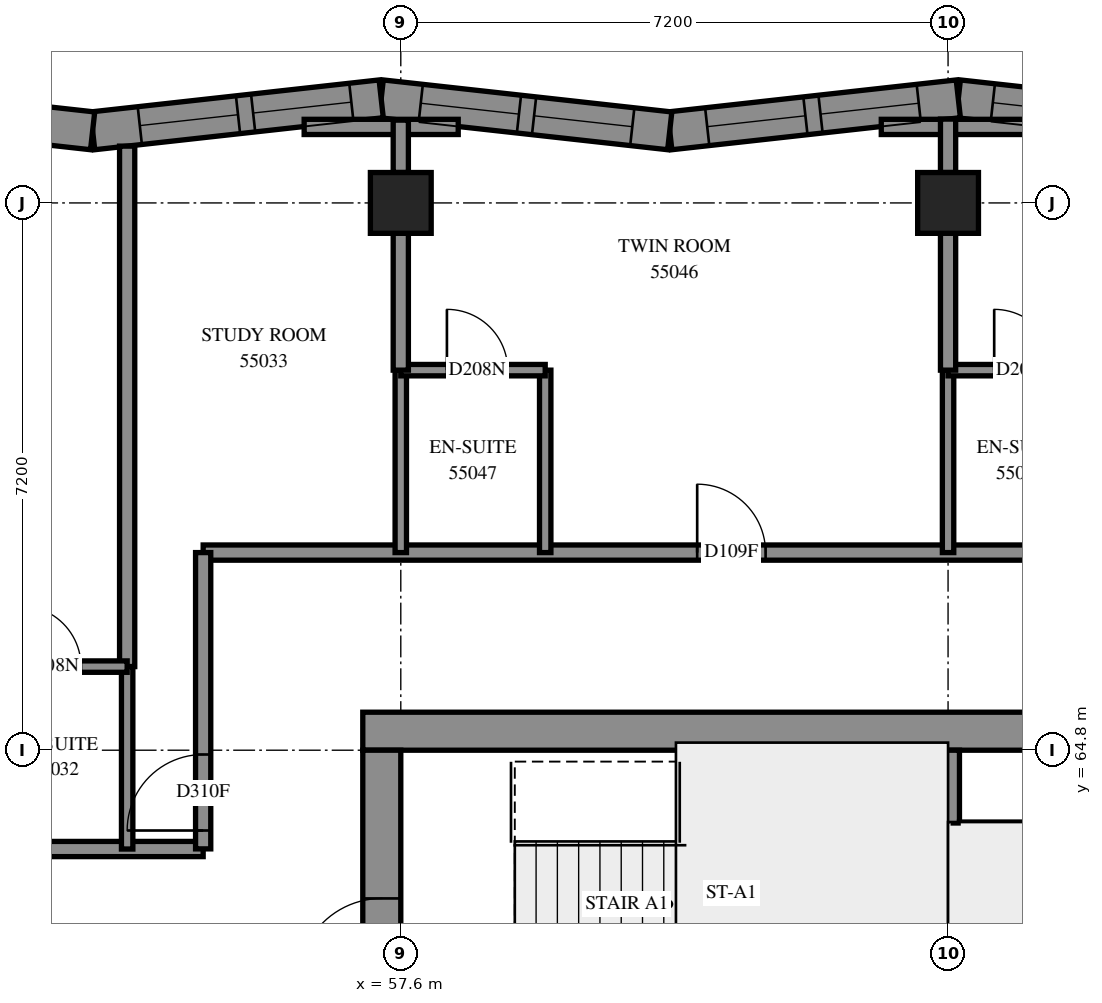
"""IFC4 building model, lengths in metres.
Left out: names, types, materials, properties, quantities, classifications, styles, units other than length and angle.
Written with IfcOpenShell. Run it as: python <this file> out.ifc"""

import sys

from ifc_helpers import new_model, si_unit, direction, frame, frame_2d, origin, origin_2d, place, context, subcontext, project, spatial, polyline, rectangle, outline, extrude, element, fill, save


model = new_model("IFC4")
c1 = context("Model", 3, precision=1e-05, world=origin(), true_north=direction((0.0, 1.0)))
c2 = subcontext(c1, "Body", "Model", "MODEL_VIEW")
j1 = project(units=[si_unit("LENGTHUNIT", "METRE"), si_unit("PLANEANGLEUNIT", "RADIAN")], contexts=[c1])
p1 = place(None, origin())
s1 = spatial("IfcSite", under=j1, at=p1, CompositionType="ELEMENT")
p2 = place(p1, origin())
s2 = spatial("IfcBuilding", under=s1, at=p2, CompositionType="ELEMENT")
p3 = place(p2, frame((0.0, 0.0, 203.2)))
s3 = spatial("IfcBuildingStorey", under=s2, at=p3, CompositionType="ELEMENT", Elevation=203.2)
for number, where, z_axis, x_axis in (
    (1, (57.6, 72.0, 0.0), (0.0, 0.0, 1.0), (1.0, 0.0, 0.0)),
    (2, (64.8, 72.0, 0.0), (0.0, 0.0, 1.0), (1.0, 0.0, 0.0)),
):
    element("IfcColumn", number, at=place(p3, frame(where, z_axis=z_axis, x_axis=x_axis)), inside=s3, PredefinedType="COLUMN", context=c2, shape_type="SweptSolid", body=[
        extrude(rectangle(XDim=0.8, YDim=0.8, at=origin_2d()), origin(), (0.0, 0.0, 1.0), 3.1),
    ])
p4 = place(p3, frame((57.1, 65.05, -0.3), z_axis=(0.0, 0.0, 1.0), x_axis=(1.0, 0.0, 0.0)))
e3 = element("IfcWall", 3, at=p4, inside=s3, PredefinedType="SHEAR", context=c2, shape_type="SweptSolid", body=[
    extrude(rectangle(XDim=15.4, YDim=0.5, at=frame_2d((7.7, 0.0))), origin(), (0.0, 0.0, 1.0), 2.7),
])
p5 = place(p4, frame((10.5, 0.0, 0.3)))
e4 = element("IfcOpeningElement", 4, at=p5, cuts=e3, PredefinedType="OPENING", context=c2, shape_type="SweptSolid", body=[
    extrude(rectangle(XDim=0.8, YDim=2.1, at=frame_2d((0.4, 1.05))), frame((0.0, 0.26, 0.0), z_axis=(0.0, -1.0, 0.0), x_axis=(1.0, 0.0, 0.0)), (0.0, 0.0, 1.0), 0.52),
])
p6 = place(p3, frame((57.35, 50.4, -0.3), z_axis=(0.0, 0.0, 1.0), x_axis=(0.0, 1.0, 0.0)))
e5 = element("IfcWall", 5, at=p6, inside=s3, PredefinedType="SHEAR", context=c2, shape_type="SweptSolid", body=[
    extrude(rectangle(XDim=14.4, YDim=0.5, at=frame_2d((7.2, 0.0))), origin(), (0.0, 0.0, 1.0), 2.7),
])
p7 = place(p6, frame((4.55, 0.0, 0.3)))
e6 = element("IfcOpeningElement", 6, at=p7, cuts=e5, PredefinedType="OPENING", context=c2, shape_type="SweptSolid", body=[
    extrude(rectangle(XDim=1.1, YDim=2.1, at=frame_2d((0.55, 1.05))), frame((0.0, 0.26, 0.0), z_axis=(0.0, -1.0, 0.0), x_axis=(1.0, 0.0, 0.0)), (0.0, 0.0, 1.0), 0.52),
])
p8 = place(p6, frame((11.35, 0.0, 0.3)))
e7 = element("IfcOpeningElement", 7, at=p8, cuts=e5, PredefinedType="OPENING", context=c2, shape_type="SweptSolid", body=[
    extrude(rectangle(XDim=1.1, YDim=2.1, at=frame_2d((0.55, 1.05))), frame((0.0, 0.26, 0.0), z_axis=(0.0, -1.0, 0.0), x_axis=(1.0, 0.0, 0.0)), (0.0, 0.0, 1.0), 0.52),
])
p9 = place(p3, frame((64.8, 60.6, 0.0), z_axis=(0.0, 0.0, 1.0), x_axis=(0.0, 1.0, 0.0)))
e8 = element("IfcWall", 8, at=p9, inside=s3, PredefinedType="SOLIDWALL", context=c2, shape_type="SweptSolid", body=[
    extrude(rectangle(XDim=4.2, YDim=0.3, at=frame_2d((2.1, 0.0))), origin(), (0.0, 0.0, 1.0), 3.1),
])
p10 = place(p3, frame((68.731, 72.948, 0.0), z_axis=(0.0, 0.0, 1.0), x_axis=(-0.99390702, 0.1102217568, 0.0)))
e9 = element("IfcWall", 9, at=p10, inside=s3, PredefinedType="SOLIDWALL", context=c2, shape_type="SweptSolid", body=[
    extrude(outline(polyline([(0.028, -0.25), (3.847, -0.25), (3.792, 0.25), (-0.028, 0.25), (0.028, -0.25)])), origin(), (0.0, 0.0, 1.0), 3.1),
])
p11 = place(p10, frame((0.562, 0.0, 0.45)))
e10 = element("IfcOpeningElement", 10, at=p11, cuts=e9, PredefinedType="OPENING", context=c2, shape_type="SweptSolid", body=[
    extrude(rectangle(XDim=1.3, YDim=2.5, at=frame_2d((0.65, 1.25))), frame((0.0, 0.26, 0.0), z_axis=(0.0, -1.0, 0.0), x_axis=(1.0, 0.0, 0.0)), (0.0, 0.0, 1.0), 0.52),
])
p12 = place(p10, frame((2.062, 0.0, 0.45)))
e11 = element("IfcOpeningElement", 11, at=p12, cuts=e9, PredefinedType="OPENING", context=c2, shape_type="SweptSolid", body=[
    extrude(rectangle(XDim=1.3, YDim=2.5, at=frame_2d((0.65, 1.25))), frame((0.0, 0.26, 0.0), z_axis=(0.0, -1.0, 0.0), x_axis=(1.0, 0.0, 0.0)), (0.0, 0.0, 1.0), 0.52),
])
p13 = place(p3, frame((64.935, 73.37, 0.0), z_axis=(0.0, 0.0, 1.0), x_axis=(-0.993907338, -0.1102188888, 0.0)))
e12 = element("IfcWall", 12, at=p13, inside=s3, PredefinedType="SOLIDWALL", context=c2, shape_type="SweptSolid", body=[
    extrude(outline(polyline([(-0.028, -0.25), (3.792, -0.25), (3.847, 0.25), (0.028, 0.25), (-0.028, -0.25)])), origin(), (0.0, 0.0, 1.0), 3.1),
])
p14 = place(p13, frame((0.524, 0.0, 0.45)))
e13 = element("IfcOpeningElement", 13, at=p14, cuts=e12, PredefinedType="OPENING", context=c2, shape_type="SweptSolid", body=[
    extrude(rectangle(XDim=1.3, YDim=2.5, at=frame_2d((0.65, 1.25))), frame((0.0, 0.26, 0.0), z_axis=(0.0, -1.0, 0.0), x_axis=(1.0, 0.0, 0.0)), (0.0, 0.0, 1.0), 0.52),
])
p15 = place(p13, frame((2.024, 0.0, 0.45)))
e14 = element("IfcOpeningElement", 14, at=p15, cuts=e12, PredefinedType="OPENING", context=c2, shape_type="SweptSolid", body=[
    extrude(rectangle(XDim=1.3, YDim=2.5, at=frame_2d((0.65, 1.25))), frame((0.0, 0.26, 0.0), z_axis=(0.0, -1.0, 0.0), x_axis=(1.0, 0.0, 0.0)), (0.0, 0.0, 1.0), 0.52),
])
p16 = place(p3, frame((61.138, 72.948, 0.0), z_axis=(0.0, 0.0, 1.0), x_axis=(-0.99390702, 0.1102217568, 0.0)))
e15 = element("IfcWall", 15, at=p16, inside=s3, PredefinedType="SOLIDWALL", context=c2, shape_type="SweptSolid", body=[
    extrude(outline(polyline([(0.028, -0.25), (3.847, -0.25), (3.792, 0.25), (-0.028, 0.25), (0.028, -0.25)])), origin(), (0.0, 0.0, 1.0), 3.1),
])
p17 = place(p16, frame((0.496, 0.0, 0.45)))
e16 = element("IfcOpeningElement", 16, at=p17, cuts=e15, PredefinedType="OPENING", context=c2, shape_type="SweptSolid", body=[
    extrude(rectangle(XDim=1.3, YDim=2.5, at=frame_2d((0.65, 1.25))), frame((0.0, 0.26, 0.0), z_axis=(0.0, -1.0, 0.0), x_axis=(1.0, 0.0, 0.0)), (0.0, 0.0, 1.0), 0.52),
])
p18 = place(p16, frame((1.996, 0.0, 0.45)))
e17 = element("IfcOpeningElement", 17, at=p18, cuts=e15, PredefinedType="OPENING", context=c2, shape_type="SweptSolid", body=[
    extrude(rectangle(XDim=1.3, YDim=2.5, at=frame_2d((0.65, 1.25))), frame((0.0, 0.26, 0.0), z_axis=(0.0, -1.0, 0.0), x_axis=(1.0, 0.0, 0.0)), (0.0, 0.0, 1.0), 0.52),
])
p19 = place(p3, frame((57.342, 73.37, 0.0), z_axis=(0.0, 0.0, 1.0), x_axis=(-0.99390702, -0.1102217568, 0.0)))
e18 = element("IfcWall", 18, at=p19, inside=s3, PredefinedType="SOLIDWALL", context=c2, shape_type="SweptSolid", body=[
    extrude(outline(polyline([(-0.028, -0.25), (3.792, -0.25), (3.847, 0.25), (0.028, 0.25), (-0.028, -0.25)])), origin(), (0.0, 0.0, 1.0), 3.1),
])
p20 = place(p19, frame((0.395, 0.0, 0.45)))
e19 = element("IfcOpeningElement", 19, at=p20, cuts=e18, PredefinedType="OPENING", context=c2, shape_type="SweptSolid", body=[
    extrude(rectangle(XDim=1.3, YDim=2.5, at=frame_2d((0.65, 1.25))), frame((0.0, 0.26, 0.0), z_axis=(0.0, -1.0, 0.0), x_axis=(1.0, 0.0, 0.0)), (0.0, 0.0, 1.0), 0.52),
])
p21 = place(p19, frame((1.895, 0.0, 0.45)))
e20 = element("IfcOpeningElement", 20, at=p21, cuts=e18, PredefinedType="OPENING", context=c2, shape_type="SweptSolid", body=[
    extrude(rectangle(XDim=1.3, YDim=2.5, at=frame_2d((0.65, 1.25))), frame((0.0, 0.26, 0.0), z_axis=(0.0, -1.0, 0.0), x_axis=(1.0, 0.0, 0.0)), (0.0, 0.0, 1.0), 0.52),
])
p22 = place(p3, frame((53.546, 72.948, 0.0), z_axis=(0.0, 0.0, 1.0), x_axis=(-0.99390702, 0.1102217568, 0.0)))
e21 = element("IfcWall", 21, at=p22, inside=s3, PredefinedType="SOLIDWALL", context=c2, shape_type="SweptSolid", body=[
    extrude(outline(polyline([(0.028, -0.25), (3.847, -0.25), (3.792, 0.25), (-0.028, 0.25), (0.028, -0.25)])), origin(), (0.0, 0.0, 1.0), 3.1),
])
p23 = place(p22, frame((1.083, 0.0, 0.45)))
e22 = element("IfcOpeningElement", 22, at=p23, cuts=e21, PredefinedType="OPENING", context=c2, shape_type="SweptSolid", body=[
    extrude(rectangle(XDim=1.2, YDim=2.5, at=frame_2d((0.6, 1.25))), frame((0.0, 0.26, 0.0), z_axis=(0.0, -1.0, 0.0), x_axis=(1.0, 0.0, 0.0)), (0.0, 0.0, 1.0), 0.52),
])
p24 = place(p3, frame((64.95, 63.78, 0.0), z_axis=(0.0, 0.0, 1.0), x_axis=(1.0, 0.0, 0.0)))
e23 = element("IfcWall", 23, at=p24, inside=s3, PredefinedType="PARTITIONING", context=c2, shape_type="SweptSolid", body=[
    extrude(rectangle(XDim=5.65, YDim=0.15, at=frame_2d((2.825, 0.0))), origin(), (0.0, 0.0, 1.0), 3.1),
])
p25 = place(p3, frame((55.0, 67.4, 0.0), z_axis=(0.0, 0.0, 1.0), x_axis=(1.0, 0.0, 0.0)))
e24 = element("IfcWall", 24, at=p25, inside=s3, PredefinedType="PARTITIONING", context=c2, shape_type="SweptSolid", body=[
    extrude(rectangle(XDim=19.6, YDim=0.2, at=frame_2d((9.8, 0.0))), origin(), (0.0, 0.0, 1.0), 3.1),
])
p26 = place(p25, frame((6.499, 0.0, 0.0)))
e25 = element("IfcOpeningElement", 25, at=p26, cuts=e24, PredefinedType="OPENING", context=c2, shape_type="SweptSolid", body=[
    extrude(rectangle(XDim=0.9, YDim=2.1, at=frame_2d((0.45, 1.05))), frame((0.0, 0.11, 0.0), z_axis=(0.0, -1.0, 0.0), x_axis=(1.0, 0.0, 0.0)), (0.0, 0.0, 1.0), 0.22),
])
p27 = place(p25, frame((14.001, 0.0, 0.0)))
e26 = element("IfcOpeningElement", 26, at=p27, cuts=e24, PredefinedType="OPENING", context=c2, shape_type="SweptSolid", body=[
    extrude(rectangle(XDim=0.9, YDim=2.1, at=frame_2d((0.45, 1.05))), frame((0.0, 0.11, 0.0), z_axis=(0.0, -1.0, 0.0), x_axis=(1.0, 0.0, 0.0)), (0.0, 0.0, 1.0), 0.22),
])
p28 = place(p3, frame((40.702, 63.5, 0.0), z_axis=(0.0, 0.0, 1.0), x_axis=(1.0, 0.0, 0.0)))
e27 = element("IfcWall", 27, at=p28, inside=s3, PredefinedType="PARTITIONING", context=c2, shape_type="SweptSolid", body=[
    extrude(rectangle(XDim=14.298, YDim=0.2, at=frame_2d((7.149, 0.0))), origin(), (0.0, 0.0, 1.0), 3.1),
])
p29 = place(p28, frame((6.332, 0.0, 0.0)))
e28 = element("IfcOpeningElement", 28, at=p29, cuts=e27, PredefinedType="OPENING", context=c2, shape_type="SweptSolid", body=[
    extrude(rectangle(XDim=0.9, YDim=2.1, at=frame_2d((0.45, 1.05))), frame((0.0, 0.11, 0.0), z_axis=(0.0, -1.0, 0.0), x_axis=(1.0, 0.0, 0.0)), (0.0, 0.0, 1.0), 0.22),
])
p30 = place(p28, frame((10.098, 0.0, 0.0)))
e29 = element("IfcOpeningElement", 29, at=p30, cuts=e27, PredefinedType="OPENING", context=c2, shape_type="SweptSolid", body=[
    extrude(rectangle(XDim=0.9, YDim=2.1, at=frame_2d((0.45, 1.05))), frame((0.0, 0.11, 0.0), z_axis=(0.0, -1.0, 0.0), x_axis=(1.0, 0.0, 0.0)), (0.0, 0.0, 1.0), 0.22),
])
p31 = place(p3, frame((54.0, 65.9, 0.0), z_axis=(0.0, 0.0, 1.0), x_axis=(0.0, 1.0, 0.0)))
e30 = element("IfcWall", 30, at=p31, inside=s3, PredefinedType="PARTITIONING", context=c2, shape_type="SweptSolid", body=[
    extrude(rectangle(XDim=6.847, YDim=0.2, at=frame_2d((3.424, 0.0))), origin(), (0.0, 0.0, 1.0), 3.1),
])
p32 = place(p3, frame((55.0, 63.502, 0.0), z_axis=(0.0, 0.0, 1.0), x_axis=(0.0, 1.0, 0.0)))
e31 = element("IfcWall", 31, at=p32, inside=s3, PredefinedType="PARTITIONING", context=c2, shape_type="SweptSolid", body=[
    extrude(rectangle(XDim=3.898, YDim=0.2, at=frame_2d((1.949, 0.0))), origin(), (0.0, 0.0, 1.0), 3.1),
])
p33 = place(p32, frame((0.242, 0.0, 0.0)))
e32 = element("IfcOpeningElement", 32, at=p33, cuts=e31, PredefinedType="OPENING", context=c2, shape_type="SweptSolid", body=[
    extrude(rectangle(XDim=1.0, YDim=2.1, at=frame_2d((0.5, 1.05))), frame((0.0, 0.11, 0.0), z_axis=(0.0, -1.0, 0.0), x_axis=(1.0, 0.0, 0.0)), (0.0, 0.0, 1.0), 0.22),
])
for number, where, z_axis, x_axis in (
    (33, (54.0, 63.5, 0.0), (0.0, 0.0, 1.0), (0.0, 1.0, 0.0)),
    (34, (59.5, 67.4, 0.0), (0.0, 0.0, 1.0), (0.0, 1.0, 0.0)),
    (35, (57.6, 67.4, 0.0), (0.0, 0.0, 1.0), (0.0, 1.0, 0.0)),
    (36, (64.8, 67.4, 0.0), (0.0, 0.0, 1.0), (0.0, 1.0, 0.0)),
):
    element("IfcWall", number, at=place(p3, frame(where, z_axis=z_axis, x_axis=x_axis)), inside=s3, PredefinedType="PARTITIONING", context=c2, shape_type="SweptSolid", body=[
        extrude(rectangle(XDim=2.4, YDim=0.15, at=frame_2d((1.2, 0.0))), origin(), (0.0, 0.0, 1.0), 3.1),
    ])
for number, where, z_axis, x_axis in (
    (37, (56.329, 73.0, 0.0), (0.0, 0.0, 1.0), (1.0, 0.0, 0.0)),
    (38, (63.921, 73.0, 0.0), (0.0, 0.0, 1.0), (1.0, 0.0, 0.0)),
):
    element("IfcWall", number, at=place(p3, frame(where, z_axis=z_axis, x_axis=x_axis)), inside=s3, PredefinedType="PARTITIONING", context=c2, shape_type="SweptSolid", body=[
        extrude(rectangle(XDim=2.027, YDim=0.2, at=frame_2d((1.013, 0.0))), origin(), (0.0, 0.0, 1.0), 3.1),
    ])
p34 = place(p3, frame((64.8, 69.8, 0.0), z_axis=(0.0, 0.0, 1.0), x_axis=(1.0, 0.0, 0.0)))
e39 = element("IfcWall", 39, at=p34, inside=s3, PredefinedType="PARTITIONING", context=c2, shape_type="SweptSolid", body=[
    extrude(rectangle(XDim=1.9, YDim=0.15, at=frame_2d((0.95, 0.0))), origin(), (0.0, 0.0, 1.0), 3.1),
])
p35 = place(p34, frame((0.607, 0.0, 0.0)))
e40 = element("IfcOpeningElement", 40, at=p35, cuts=e39, PredefinedType="OPENING", context=c2, shape_type="SweptSolid", body=[
    extrude(rectangle(XDim=0.8, YDim=2.1, at=frame_2d((0.4, 1.05))), frame((0.0, 0.085, 0.0), z_axis=(0.0, -1.0, 0.0), x_axis=(1.0, 0.0, 0.0)), (0.0, 0.0, 1.0), 0.17),
])
p36 = place(p3, frame((52.1, 65.9, 0.0), z_axis=(0.0, 0.0, 1.0), x_axis=(1.0, 0.0, 0.0)))
e41 = element("IfcWall", 41, at=p36, inside=s3, PredefinedType="PARTITIONING", context=c2, shape_type="SweptSolid", body=[
    extrude(rectangle(XDim=1.9, YDim=0.15, at=frame_2d((0.95, 0.0))), origin(), (0.0, 0.0, 1.0), 3.1),
])
p37 = place(p36, frame((0.493, 0.0, 0.0)))
e42 = element("IfcOpeningElement", 42, at=p37, cuts=e41, PredefinedType="OPENING", context=c2, shape_type="SweptSolid", body=[
    extrude(rectangle(XDim=0.8, YDim=2.1, at=frame_2d((0.4, 1.05))), frame((0.0, 0.085, 0.0), z_axis=(0.0, -1.0, 0.0), x_axis=(1.0, 0.0, 0.0)), (0.0, 0.0, 1.0), 0.17),
])
p38 = place(p3, frame((57.6, 69.8, 0.0), z_axis=(0.0, 0.0, 1.0), x_axis=(1.0, 0.0, 0.0)))
e43 = element("IfcWall", 43, at=p38, inside=s3, PredefinedType="PARTITIONING", context=c2, shape_type="SweptSolid", body=[
    extrude(rectangle(XDim=1.9, YDim=0.15, at=frame_2d((0.95, 0.0))), origin(), (0.0, 0.0, 1.0), 3.1),
])
p39 = place(p38, frame((0.607, 0.0, 0.0)))
e44 = element("IfcOpeningElement", 44, at=p39, cuts=e43, PredefinedType="OPENING", context=c2, shape_type="SweptSolid", body=[
    extrude(rectangle(XDim=0.8, YDim=2.1, at=frame_2d((0.4, 1.05))), frame((0.0, 0.085, 0.0), z_axis=(0.0, -1.0, 0.0), x_axis=(1.0, 0.0, 0.0)), (0.0, 0.0, 1.0), 0.17),
])
for number, where, z_axis, x_axis in (
    (45, (57.6, 69.8, 0.0), (0.0, 0.0, 1.0), (0.0, 1.0, 0.0)),
    (46, (64.8, 69.8, 0.0), (0.0, 0.0, 1.0), (0.0, 1.0, 0.0)),
):
    element("IfcWall", number, at=place(p3, frame(where, z_axis=z_axis, x_axis=x_axis)), inside=s3, PredefinedType="PARTITIONING", context=c2, shape_type="SweptSolid", body=[
        extrude(rectangle(XDim=1.8, YDim=0.2, at=frame_2d((0.9, 0.0))), origin(), (0.0, 0.0, 1.0), 3.1),
    ])
p40 = place(p3, frame((64.8, 72.4, 0.0), z_axis=(0.0, 0.0, 1.0), x_axis=(0.0, 1.0, 0.0)))
e47 = element("IfcWall", 47, at=p40, inside=s3, PredefinedType="PARTITIONING", context=c2, shape_type="SweptSolid", body=[
    extrude(rectangle(XDim=0.703, YDim=0.2, at=frame_2d((0.351, 0.0))), origin(), (0.0, 0.0, 1.0), 3.1),
])
p41 = place(p3, frame((57.6, 72.4, 0.0), z_axis=(0.0, 0.0, 1.0), x_axis=(0.0, 1.0, 0.0)))
e48 = element("IfcWall", 48, at=p41, inside=s3, PredefinedType="PARTITIONING", context=c2, shape_type="SweptSolid", body=[
    extrude(rectangle(XDim=0.689, YDim=0.2, at=frame_2d((0.345, 0.0))), origin(), (0.0, 0.0, 1.0), 3.1),
])
p42 = place(p12, origin())
e49 = element("IfcWindow", 49, at=p42, inside=s3, PartitioningType="SINGLE_PANEL", PredefinedType="WINDOW", context=c2, shape_type="SweptSolid", body=[
    extrude(rectangle(XDim=1.3, YDim=2.5, at=frame_2d((0.65, 1.25))), frame((0.0, 0.12, 0.0), z_axis=(0.0, -1.0, 0.0), x_axis=(1.0, 0.0, 0.0)), (0.0, 0.0, 1.0), 0.06),
])
fill(e11, e49)
p43 = place(p14, origin())
e50 = element("IfcWindow", 50, at=p43, inside=s3, PartitioningType="SINGLE_PANEL", PredefinedType="WINDOW", context=c2, shape_type="SweptSolid", body=[
    extrude(rectangle(XDim=1.3, YDim=2.5, at=frame_2d((0.65, 1.25))), frame((0.0, 0.12, 0.0), z_axis=(0.0, -1.0, 0.0), x_axis=(1.0, 0.0, 0.0)), (0.0, 0.0, 1.0), 0.06),
])
fill(e13, e50)
p44 = place(p15, origin())
e51 = element("IfcWindow", 51, at=p44, inside=s3, PartitioningType="SINGLE_PANEL", PredefinedType="WINDOW", context=c2, shape_type="SweptSolid", body=[
    extrude(rectangle(XDim=1.3, YDim=2.5, at=frame_2d((0.65, 1.25))), frame((0.0, 0.18, 0.0), z_axis=(0.0, -1.0, 0.0), x_axis=(1.0, 0.0, 0.0)), (0.0, 0.0, 1.0), 0.06),
])
fill(e14, e51)
p45 = place(p17, origin())
e52 = element("IfcWindow", 52, at=p45, inside=s3, PartitioningType="SINGLE_PANEL", PredefinedType="WINDOW", context=c2, shape_type="SweptSolid", body=[
    extrude(rectangle(XDim=1.3, YDim=2.5, at=frame_2d((0.65, 1.25))), frame((0.0, 0.18, 0.0), z_axis=(0.0, -1.0, 0.0), x_axis=(1.0, 0.0, 0.0)), (0.0, 0.0, 1.0), 0.06),
])
fill(e16, e52)
p46 = place(p18, origin())
e53 = element("IfcWindow", 53, at=p46, inside=s3, PartitioningType="SINGLE_PANEL", PredefinedType="WINDOW", context=c2, shape_type="SweptSolid", body=[
    extrude(rectangle(XDim=1.3, YDim=2.5, at=frame_2d((0.65, 1.25))), frame((0.0, 0.12, 0.0), z_axis=(0.0, -1.0, 0.0), x_axis=(1.0, 0.0, 0.0)), (0.0, 0.0, 1.0), 0.06),
])
fill(e17, e53)
p47 = place(p20, origin())
e54 = element("IfcWindow", 54, at=p47, inside=s3, PartitioningType="SINGLE_PANEL", PredefinedType="WINDOW", context=c2, shape_type="SweptSolid", body=[
    extrude(rectangle(XDim=1.3, YDim=2.5, at=frame_2d((0.65, 1.25))), frame((0.0, 0.12, 0.0), z_axis=(0.0, -1.0, 0.0), x_axis=(1.0, 0.0, 0.0)), (0.0, 0.0, 1.0), 0.06),
])
fill(e19, e54)
p48 = place(p21, origin())
e55 = element("IfcWindow", 55, at=p48, inside=s3, PartitioningType="SINGLE_PANEL", PredefinedType="WINDOW", context=c2, shape_type="SweptSolid", body=[
    extrude(rectangle(XDim=1.3, YDim=2.5, at=frame_2d((0.65, 1.25))), frame((0.0, 0.18, 0.0), z_axis=(0.0, -1.0, 0.0), x_axis=(1.0, 0.0, 0.0)), (0.0, 0.0, 1.0), 0.06),
])
fill(e20, e55)
p49 = place(p8, origin())
e56 = element("IfcDoor", 56, at=p49, inside=s3, OperationType="SINGLE_SWING_LEFT", PredefinedType="DOOR", context=c2, shape_type="SweptSolid", body=[
    extrude(rectangle(XDim=1.1, YDim=2.1, at=frame_2d((0.55, 1.05))), frame((0.0, 0.025, 0.0), z_axis=(0.0, -1.0, 0.0), x_axis=(1.0, 0.0, 0.0)), (0.0, 0.0, 1.0), 0.05),
])
fill(e7, e56)
p50 = place(p37, origin())
e57 = element("IfcDoor", 57, at=p50, inside=s3, OperationType="SINGLE_SWING_RIGHT", PredefinedType="DOOR", context=c2, shape_type="SweptSolid", body=[
    extrude(rectangle(XDim=0.8, YDim=2.1, at=frame_2d((0.4, 1.05))), frame((0.0, 0.025, 0.0), z_axis=(0.0, -1.0, 0.0), x_axis=(1.0, 0.0, 0.0)), (0.0, 0.0, 1.0), 0.05),
])
fill(e42, e57)
p51 = place(p33, origin())
e58 = element("IfcDoor", 58, at=p51, inside=s3, OperationType="SINGLE_SWING_LEFT", PredefinedType="DOOR", context=c2, shape_type="SweptSolid", body=[
    extrude(rectangle(XDim=1.0, YDim=2.1, at=frame_2d((0.5, 1.05))), frame((0.0, 0.025, 0.0), z_axis=(0.0, -1.0, 0.0), x_axis=(1.0, 0.0, 0.0)), (0.0, 0.0, 1.0), 0.05),
])
fill(e32, e58)
p52 = place(p26, origin())
e59 = element("IfcDoor", 59, at=p52, inside=s3, OperationType="SINGLE_SWING_RIGHT", PredefinedType="DOOR", context=c2, shape_type="SweptSolid", body=[
    extrude(rectangle(XDim=0.9, YDim=2.1, at=frame_2d((0.45, 1.05))), frame((0.0, 0.025, 0.0), z_axis=(0.0, -1.0, 0.0), x_axis=(1.0, 0.0, 0.0)), (0.0, 0.0, 1.0), 0.05),
])
fill(e25, e59)
p53 = place(p39, origin())
e60 = element("IfcDoor", 60, at=p53, inside=s3, OperationType="SINGLE_SWING_RIGHT", PredefinedType="DOOR", context=c2, shape_type="SweptSolid", body=[
    extrude(rectangle(XDim=0.8, YDim=2.1, at=frame_2d((0.4, 1.05))), frame((0.0, 0.025, 0.0), z_axis=(0.0, -1.0, 0.0), x_axis=(1.0, 0.0, 0.0)), (0.0, 0.0, 1.0), 0.05),
])
fill(e44, e60)
p54 = place(p35, origin())
e61 = element("IfcDoor", 61, at=p54, inside=s3, OperationType="SINGLE_SWING_RIGHT", PredefinedType="DOOR", context=c2, shape_type="SweptSolid", body=[
    extrude(rectangle(XDim=0.8, YDim=2.1, at=frame_2d((0.4, 1.05))), frame((0.0, 0.025, 0.0), z_axis=(0.0, -1.0, 0.0), x_axis=(1.0, 0.0, 0.0)), (0.0, 0.0, 1.0), 0.05),
])
fill(e40, e61)
save(model, sys.argv[1])
